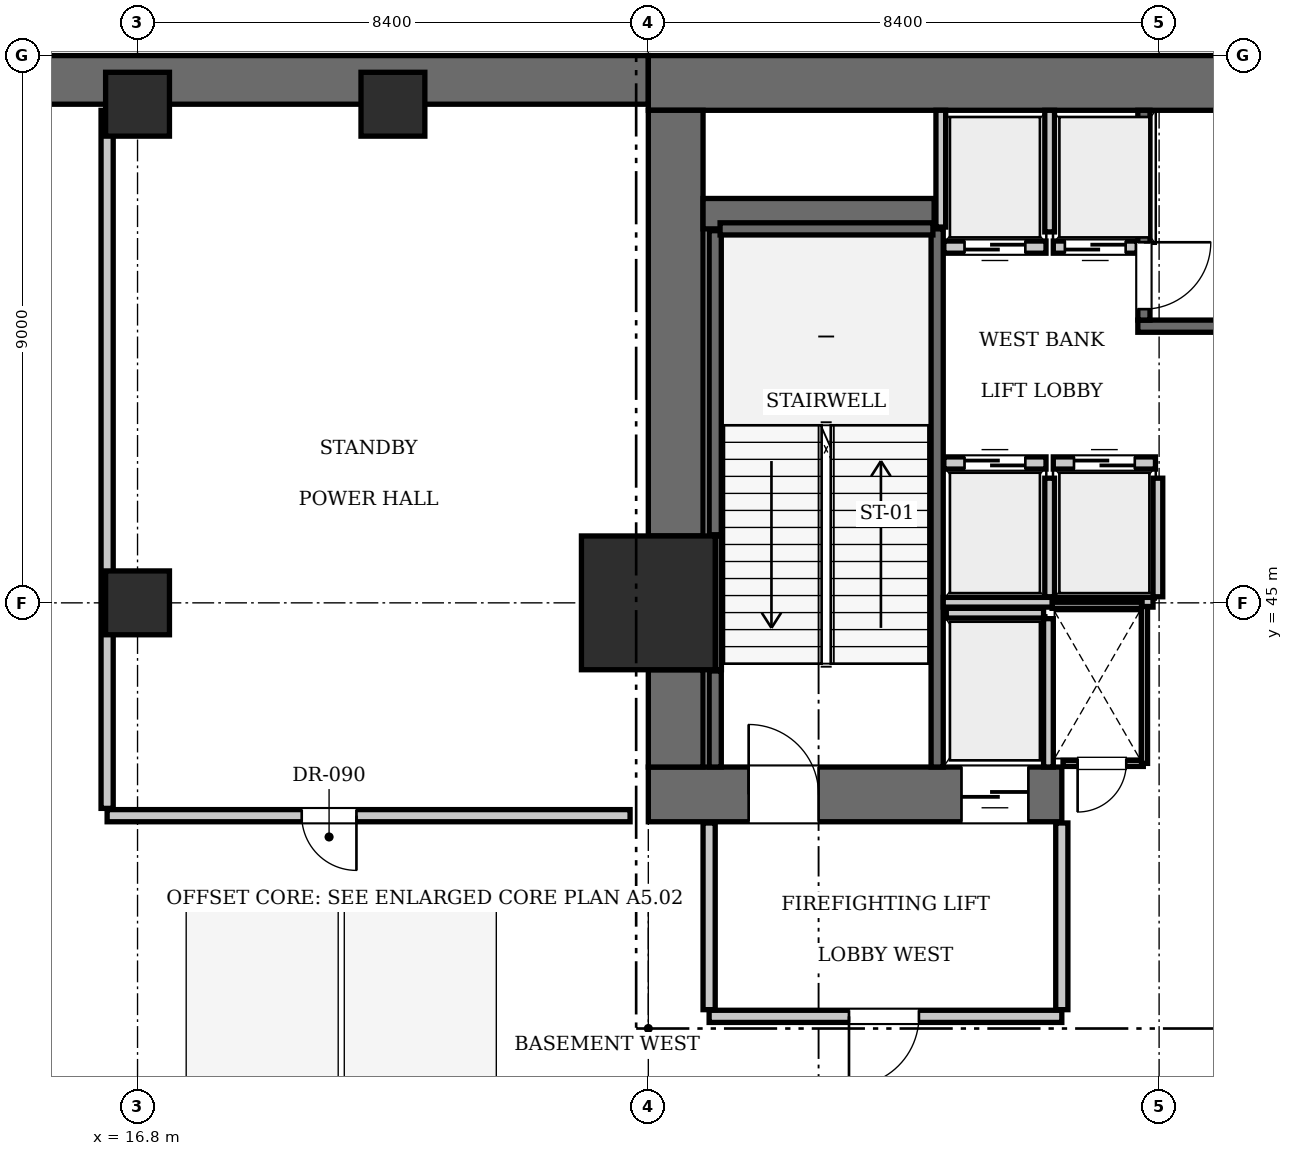
"""IFC4 building model, lengths in metres.
Left out: names, types, materials, properties, quantities, classifications, styles, units other than length and angle.
Written with IfcOpenShell. Run it as: python <this file> out.ifc"""

import sys

from ifc_helpers import new_model, si_unit, direction, frame, frame_2d, origin, origin_2d, place, context, subcontext, project, spatial, rectangle, extrude, element, fill, save


model = new_model("IFC4")
c1 = context("Model", 3, precision=1e-05, world=origin(), true_north=direction((0.0, 1.0)))
c2 = subcontext(c1, "Body", "Model", "MODEL_VIEW")
j1 = project(units=[si_unit("LENGTHUNIT", "METRE"), si_unit("PLANEANGLEUNIT", "RADIAN")], contexts=[c1])
p1 = place(None, origin())
s1 = spatial("IfcSite", under=j1, at=p1, CompositionType="ELEMENT")
p2 = place(p1, origin())
s2 = spatial("IfcBuilding", under=s1, at=p2, CompositionType="ELEMENT")
p3 = place(p2, frame((0.0, 0.0, -5.25)))
s3 = spatial("IfcBuildingStorey", under=s2, at=p3, CompositionType="ELEMENT", Elevation=-5.25)
p4 = place(p3, frame((0.0, 53.6, 0.0), z_axis=(0.0, 0.0, 1.0), x_axis=(1.0, 0.0, 0.0)))
e1 = element("IfcWall", 1, at=p4, inside=s3, PredefinedType="USERDEFINED", context=c2, shape_type="SweptSolid", body=[
    extrude(rectangle(XDim=25.2, YDim=0.8, at=frame_2d((12.6, 0.0))), origin(), (0.0, 0.0, 1.0), 5.25),
])
p5 = place(p3, frame((25.2, 45.0, 0.0), z_axis=(0.0, 0.0, 1.0), x_axis=(1.0, 0.0, 0.0)))
e2 = element("IfcColumn", 2, at=p5, inside=s3, PredefinedType="COLUMN", context=c2, shape_type="SweptSolid", body=[
    extrude(rectangle(XDim=2.2, YDim=2.2, at=origin_2d()), origin(), (0.0, 0.0, 1.0), 5.25),
])
p6 = place(p3, frame((25.2, 53.55, 0.0), z_axis=(0.0, 0.0, 1.0), x_axis=(1.0, 0.0, 0.0)))
e3 = element("IfcWall", 3, at=p6, inside=s3, PredefinedType="SHEAR", context=c2, shape_type="SweptSolid", body=[
    extrude(rectangle(XDim=25.2, YDim=0.9, at=frame_2d((12.6, 0.0))), origin(), (0.0, 0.0, 1.0), 5.25),
])
p7 = place(p3, frame((25.2, 41.85, 0.0), z_axis=(0.0, 0.0, 1.0), x_axis=(1.0, 0.0, 0.0)))
e4 = element("IfcWall", 4, at=p7, inside=s3, PredefinedType="SHEAR", context=c2, shape_type="SweptSolid", body=[
    extrude(rectangle(XDim=6.8, YDim=0.9, at=frame_2d((3.4, 0.0))), origin(), (0.0, 0.0, 1.0), 5.25),
])
p8 = place(p7, frame((1.65, 0.0, 0.0)))
e5 = element("IfcOpeningElement", 5, at=p8, cuts=e4, PredefinedType="OPENING", context=c2, shape_type="SweptSolid", body=[
    extrude(rectangle(XDim=1.15, YDim=2.15, at=frame_2d((0.575, 1.075))), frame((0.0, 0.46, 0.0), z_axis=(0.0, -1.0, 0.0), x_axis=(1.0, 0.0, 0.0)), (0.0, 0.0, 1.0), 0.92),
])
p9 = place(p7, frame((5.15, 0.0, 0.0)))
e6 = element("IfcOpeningElement", 6, at=p9, cuts=e4, PredefinedType="OPENING", context=c2, shape_type="SweptSolid", body=[
    extrude(rectangle(XDim=1.1, YDim=2.2, at=frame_2d((0.55, 1.1))), frame((0.0, 0.46, 0.0), z_axis=(0.0, -1.0, 0.0), x_axis=(1.0, 0.0, 0.0)), (0.0, 0.0, 1.0), 0.92),
])
p10 = place(p3, frame((25.65, 42.3, 0.0), z_axis=(0.0, 0.0, 1.0), x_axis=(0.0, 1.0, 0.0)))
e7 = element("IfcWall", 7, at=p10, inside=s3, PredefinedType="SHEAR", context=c2, shape_type="SweptSolid", body=[
    extrude(rectangle(XDim=1.6, YDim=0.9, at=frame_2d((0.8, 0.0))), origin(), (0.0, 0.0, 1.0), 5.25),
])
p11 = place(p3, frame((25.65, 46.1, 0.0), z_axis=(0.0, 0.0, 1.0), x_axis=(0.0, 1.0, 0.0)))
e8 = element("IfcWall", 8, at=p11, inside=s3, PredefinedType="SHEAR", context=c2, shape_type="SweptSolid", body=[
    extrude(rectangle(XDim=7.0, YDim=0.9, at=frame_2d((3.5, 0.0))), origin(), (0.0, 0.0, 1.0), 5.25),
])
p12 = place(p3, frame((26.1, 51.4, 0.0), z_axis=(0.0, 0.0, 1.0), x_axis=(1.0, 0.0, 0.0)))
e9 = element("IfcWall", 9, at=p12, inside=s3, PredefinedType="SHEAR", context=c2, shape_type="SweptSolid", body=[
    extrude(rectangle(XDim=3.8, YDim=0.5, at=frame_2d((1.9, 0.0))), origin(), (0.0, 0.0, 1.0), 5.25),
])
for number, where, z_axis, x_axis in (
    (10, (16.8, 45.0, 0.0), (0.0, 0.0, 1.0), (1.0, 0.0, 0.0)),
    (11, (16.8, 53.2, 0.0), (0.0, 0.0, 1.0), (1.0, 0.0, 0.0)),
    (12, (21.0, 53.2, 0.0), (0.0, 0.0, 1.0), (1.0, 0.0, 0.0)),
):
    element("IfcColumn", number, at=place(p3, frame(where, z_axis=z_axis, x_axis=x_axis)), inside=s3, PredefinedType="COLUMN", context=c2, shape_type="SweptSolid", body=[
        extrude(rectangle(XDim=1.05, YDim=1.05, at=origin_2d()), origin(), (0.0, 0.0, 1.0), 5.25),
    ])
p13 = place(p3, frame((29.95, 42.3, 0.0), z_axis=(0.0, 0.0, 1.0), x_axis=(0.0, 1.0, 0.0)))
e13 = element("IfcWall", 13, at=p13, inside=s3, PredefinedType="SOLIDWALL", context=c2, shape_type="SweptSolid", body=[
    extrude(rectangle(XDim=8.85, YDim=0.2, at=frame_2d((4.425, 0.0))), origin(), (0.0, 0.0, 1.0), 4.97),
])
p14 = place(p3, frame((26.3, 42.3, 0.0), z_axis=(0.0, 0.0, 1.0), x_axis=(0.0, 1.0, 0.0)))
e14 = element("IfcWall", 14, at=p14, inside=s3, PredefinedType="SOLIDWALL", context=c2, shape_type="SweptSolid", body=[
    extrude(rectangle(XDim=1.58, YDim=0.2, at=frame_2d((0.79, 0.0))), origin(), (0.0, 0.0, 1.0), 4.97),
])
p15 = place(p3, frame((26.3, 46.12, 0.0), z_axis=(0.0, 0.0, 1.0), x_axis=(0.0, 1.0, 0.0)))
e15 = element("IfcWall", 15, at=p15, inside=s3, PredefinedType="SOLIDWALL", context=c2, shape_type="SweptSolid", body=[
    extrude(rectangle(XDim=5.0, YDim=0.2, at=frame_2d((2.5, 0.0))), origin(), (0.0, 0.0, 1.0), 4.97),
])
p16 = place(p3, frame((26.38, 51.15, 0.0), z_axis=(0.0, 0.0, 1.0), x_axis=(1.0, 0.0, 0.0)))
e16 = element("IfcWall", 16, at=p16, inside=s3, PredefinedType="SOLIDWALL", context=c2, shape_type="SweptSolid", body=[
    extrude(rectangle(XDim=3.5, YDim=0.2, at=frame_2d((1.75, 0.0))), origin(), (0.0, 0.0, 1.0), 4.97),
])
p17 = place(p3, frame((26.352, 43.9, 0.0), z_axis=(0.0, 0.0, 1.0), x_axis=(0.0, 1.0, 0.0)))
e17 = element("IfcWall", 17, at=p17, inside=s3, PredefinedType="SOLIDWALL", context=c2, shape_type="SweptSolid", body=[
    extrude(rectangle(XDim=2.2, YDim=0.1, at=frame_2d((1.1, 0.0))), origin(), (0.0, 0.0, 1.0), 4.97),
])
p18 = place(p3, frame((33.25, 49.55, 0.0), z_axis=(0.0, 0.0, 1.0), x_axis=(1.0, 0.0, 0.0)))
e18 = element("IfcWall", 18, at=p18, inside=s3, PredefinedType="SOLIDWALL", context=c2, shape_type="SweptSolid", body=[
    extrude(rectangle(XDim=9.1, YDim=0.2, at=frame_2d((4.55, 0.0))), origin(), (0.0, 0.0, 1.0), 4.97),
])
p19 = place(p3, frame((33.35, 49.65, 0.0), z_axis=(0.0, 0.0, 1.0), x_axis=(0.0, 1.0, 0.0)))
e19 = element("IfcWall", 19, at=p19, inside=s3, PredefinedType="SOLIDWALL", context=c2, shape_type="SweptSolid", body=[
    extrude(rectangle(XDim=3.45, YDim=0.2, at=frame_2d((1.725, 0.0))), origin(), (0.0, 0.0, 1.0), 4.97),
])
p20 = place(p19, frame((0.18, 0.0, 0.0)))
e20 = element("IfcOpeningElement", 20, at=p20, cuts=e19, PredefinedType="OPENING", context=c2, shape_type="SweptSolid", body=[
    extrude(rectangle(XDim=1.1, YDim=2.15, at=frame_2d((0.55, 1.075))), frame((0.0, 0.11, 0.0), z_axis=(0.0, -1.0, 0.0), x_axis=(1.0, 0.0, 0.0)), (0.0, 0.0, 1.0), 0.22),
])
p21 = place(p3, frame((30.06, 47.3, 0.0), z_axis=(0.0, 0.0, 1.0), x_axis=(1.0, 0.0, 0.0)))
e21 = element("IfcWall", 21, at=p21, inside=s3, PredefinedType="SOLIDWALL", context=c2, shape_type="SweptSolid", body=[
    extrude(rectangle(XDim=1.68, YDim=0.2, at=frame_2d((0.84, 0.0))), origin(), (0.0, 0.0, 1.0), 4.97),
])
p22 = place(p21, frame((0.34, 0.0, 0.0)))
e22 = element("IfcOpeningElement", 22, at=p22, cuts=e21, PredefinedType="OPENING", context=c2, shape_type="SweptSolid", body=[
    extrude(rectangle(XDim=1.0, YDim=2.15, at=frame_2d((0.5, 1.075))), frame((0.0, 0.11, 0.0), z_axis=(0.0, -1.0, 0.0), x_axis=(1.0, 0.0, 0.0)), (0.0, 0.0, 1.0), 0.22),
])
p23 = place(p3, frame((31.86, 47.3, 0.0), z_axis=(0.0, 0.0, 1.0), x_axis=(1.0, 0.0, 0.0)))
e23 = element("IfcWall", 23, at=p23, inside=s3, PredefinedType="SOLIDWALL", context=c2, shape_type="SweptSolid", body=[
    extrude(rectangle(XDim=1.68, YDim=0.2, at=frame_2d((0.84, 0.0))), origin(), (0.0, 0.0, 1.0), 4.97),
])
p24 = place(p23, frame((0.34, 0.0, 0.0)))
e24 = element("IfcOpeningElement", 24, at=p24, cuts=e23, PredefinedType="OPENING", context=c2, shape_type="SweptSolid", body=[
    extrude(rectangle(XDim=1.0, YDim=2.15, at=frame_2d((0.5, 1.075))), frame((0.0, 0.11, 0.0), z_axis=(0.0, -1.0, 0.0), x_axis=(1.0, 0.0, 0.0)), (0.0, 0.0, 1.0), 0.22),
])
p25 = place(p3, frame((30.06, 50.85, 0.0), z_axis=(0.0, 0.0, 1.0), x_axis=(1.0, 0.0, 0.0)))
e25 = element("IfcWall", 25, at=p25, inside=s3, PredefinedType="SOLIDWALL", context=c2, shape_type="SweptSolid", body=[
    extrude(rectangle(XDim=1.68, YDim=0.2, at=frame_2d((0.84, 0.0))), origin(), (0.0, 0.0, 1.0), 4.97),
])
p26 = place(p25, frame((0.34, 0.0, 0.0)))
e26 = element("IfcOpeningElement", 26, at=p26, cuts=e25, PredefinedType="OPENING", context=c2, shape_type="SweptSolid", body=[
    extrude(rectangle(XDim=1.0, YDim=2.15, at=frame_2d((0.5, 1.075))), frame((0.0, 0.11, 0.0), z_axis=(0.0, -1.0, 0.0), x_axis=(1.0, 0.0, 0.0)), (0.0, 0.0, 1.0), 0.22),
])
p27 = place(p3, frame((31.86, 50.85, 0.0), z_axis=(0.0, 0.0, 1.0), x_axis=(1.0, 0.0, 0.0)))
e27 = element("IfcWall", 27, at=p27, inside=s3, PredefinedType="SOLIDWALL", context=c2, shape_type="SweptSolid", body=[
    extrude(rectangle(XDim=1.38, YDim=0.2, at=frame_2d((0.69, 0.0))), origin(), (0.0, 0.0, 1.0), 4.97),
])
p28 = place(p27, frame((0.19, 0.0, 0.0)))
e28 = element("IfcOpeningElement", 28, at=p28, cuts=e27, PredefinedType="OPENING", context=c2, shape_type="SweptSolid", body=[
    extrude(rectangle(XDim=1.0, YDim=2.15, at=frame_2d((0.5, 1.075))), frame((0.0, 0.11, 0.0), z_axis=(0.0, -1.0, 0.0), x_axis=(1.0, 0.0, 0.0)), (0.0, 0.0, 1.0), 0.22),
])
p29 = place(p3, frame((30.1, 44.83, 0.0), z_axis=(0.0, 0.0, 1.0), x_axis=(1.0, 0.0, 0.0)))
e29 = element("IfcWall", 29, at=p29, inside=s3, PredefinedType="SOLIDWALL", context=c2, shape_type="SweptSolid", body=[
    extrude(rectangle(XDim=1.6, YDim=0.16, at=frame_2d((0.8, 0.0))), origin(), (0.0, 0.0, 1.0), 4.97),
])
p30 = place(p3, frame((31.78, 42.3, 0.0), z_axis=(0.0, 0.0, 1.0), x_axis=(0.0, 1.0, 0.0)))
e30 = element("IfcWall", 30, at=p30, inside=s3, PredefinedType="SOLIDWALL", context=c2, shape_type="SweptSolid", body=[
    extrude(rectangle(XDim=2.44, YDim=0.16, at=frame_2d((1.22, 0.0))), origin(), (0.0, 0.0, 1.0), 4.97),
])
for number, where, z_axis, x_axis in (
    (31, (31.8, 45.1, 0.0), (0.0, 0.0, 1.0), (0.0, 1.0, 0.0)),
    (32, (33.58, 45.1, 0.0), (0.0, 0.0, 1.0), (0.0, 1.0, 0.0)),
):
    element("IfcWall", number, at=place(p3, frame(where, z_axis=z_axis, x_axis=x_axis)), inside=s3, PredefinedType="SOLIDWALL", context=c2, shape_type="SweptSolid", body=[
        extrude(rectangle(XDim=1.95, YDim=0.16, at=frame_2d((0.975, 0.0))), origin(), (0.0, 0.0, 1.0), 4.97),
    ])
p31 = place(p3, frame((30.05, 45.01, 0.0), z_axis=(0.0, 0.0, 1.0), x_axis=(1.0, 0.0, 0.0)))
e33 = element("IfcWall", 33, at=p31, inside=s3, PredefinedType="SOLIDWALL", context=c2, shape_type="SweptSolid", body=[
    extrude(rectangle(XDim=3.45, YDim=0.16, at=frame_2d((1.725, 0.0))), origin(), (0.0, 0.0, 1.0), 4.97),
])
p32 = place(p3, frame((30.01, 51.18, 0.0), z_axis=(0.0, 0.0, 1.0), x_axis=(0.0, 1.0, 0.0)))
e34 = element("IfcWall", 34, at=p32, inside=s3, PredefinedType="SOLIDWALL", context=c2, shape_type="SweptSolid", body=[
    extrude(rectangle(XDim=1.92, YDim=0.16, at=frame_2d((0.96, 0.0))), origin(), (0.0, 0.0, 1.0), 4.97),
])
p33 = place(p3, frame((31.8, 51.1, 0.0), z_axis=(0.0, 0.0, 1.0), x_axis=(0.0, 1.0, 0.0)))
e35 = element("IfcWall", 35, at=p33, inside=s3, PredefinedType="SOLIDWALL", context=c2, shape_type="SweptSolid", body=[
    extrude(rectangle(XDim=2.0, YDim=0.16, at=frame_2d((1.0, 0.0))), origin(), (0.0, 0.0, 1.0), 4.97),
])
p34 = place(p3, frame((26.2, 38.2, 0.0), z_axis=(0.0, 0.0, 1.0), x_axis=(1.0, 0.0, 0.0)))
e36 = element("IfcWall", 36, at=p34, inside=s3, PredefinedType="PARTITIONING", context=c2, shape_type="SweptSolid", body=[
    extrude(rectangle(XDim=5.8, YDim=0.2, at=frame_2d((2.9, 0.0))), origin(), (0.0, 0.0, 1.0), 4.97),
])
p35 = place(p34, frame((2.3, 0.0, 0.0)))
e37 = element("IfcOpeningElement", 37, at=p35, cuts=e36, PredefinedType="OPENING", context=c2, shape_type="SweptSolid", body=[
    extrude(rectangle(XDim=1.15, YDim=2.15, at=frame_2d((0.575, 1.075))), frame((0.0, 0.11, 0.0), z_axis=(0.0, -1.0, 0.0), x_axis=(1.0, 0.0, 0.0)), (0.0, 0.0, 1.0), 0.22),
])
for number, where, z_axis, x_axis in (
    (38, (26.2, 38.31, 0.0), (0.0, 0.0, 1.0), (0.0, 1.0, 0.0)),
    (39, (32.0, 38.31, 0.0), (0.0, 0.0, 1.0), (0.0, 1.0, 0.0)),
):
    element("IfcWall", number, at=place(p3, frame(where, z_axis=z_axis, x_axis=x_axis)), inside=s3, PredefinedType="PARTITIONING", context=c2, shape_type="SweptSolid", body=[
        extrude(rectangle(XDim=3.07, YDim=0.2, at=frame_2d((1.535, 0.0))), origin(), (0.0, 0.0, 1.0), 4.97),
    ])
p36 = place(p3, frame((32.02, 42.36, 0.0), z_axis=(0.0, 0.0, 1.0), x_axis=(1.0, 0.0, 0.0)))
e40 = element("IfcWall", 40, at=p36, inside=s3, PredefinedType="PARTITIONING", context=c2, shape_type="SweptSolid", body=[
    extrude(rectangle(XDim=1.32, YDim=0.1, at=frame_2d((0.66, 0.0))), origin(), (0.0, 0.0, 1.0), 4.97),
])
p37 = place(p36, frame((0.24, 0.0, 0.0)))
e41 = element("IfcOpeningElement", 41, at=p37, cuts=e40, PredefinedType="OPENING", context=c2, shape_type="SweptSolid", body=[
    extrude(rectangle(XDim=0.8, YDim=2.05, at=frame_2d((0.4, 1.025))), frame((0.0, 0.06, 0.0), z_axis=(0.0, -1.0, 0.0), x_axis=(1.0, 0.0, 0.0)), (0.0, 0.0, 1.0), 0.12),
])
p38 = place(p3, frame((31.84, 44.96, 0.0), z_axis=(0.0, 0.0, 1.0), x_axis=(1.0, 0.0, 0.0)))
e42 = element("IfcWall", 42, at=p38, inside=s3, PredefinedType="PARTITIONING", context=c2, shape_type="SweptSolid", body=[
    extrude(rectangle(XDim=1.48, YDim=0.1, at=frame_2d((0.74, 0.0))), origin(), (0.0, 0.0, 1.0), 4.97),
])
p39 = place(p3, frame((33.36, 42.36, 0.0), z_axis=(0.0, 0.0, 1.0), x_axis=(0.0, 1.0, 0.0)))
e43 = element("IfcWall", 43, at=p39, inside=s3, PredefinedType="PARTITIONING", context=c2, shape_type="SweptSolid", body=[
    extrude(rectangle(XDim=2.58, YDim=0.1, at=frame_2d((1.29, 0.0))), origin(), (0.0, 0.0, 1.0), 4.97),
])
p40 = place(p3, frame((16.3, 41.5, 0.0), z_axis=(0.0, 0.0, 1.0), x_axis=(1.0, 0.0, 0.0)))
e44 = element("IfcWall", 44, at=p40, inside=s3, PredefinedType="PARTITIONING", context=c2, shape_type="SweptSolid", body=[
    extrude(rectangle(XDim=8.6, YDim=0.2, at=frame_2d((4.3, 0.0))), origin(), (0.0, 0.0, 1.0), 4.97),
])
p41 = place(p40, frame((3.2, 0.0, 0.0)))
e45 = element("IfcOpeningElement", 45, at=p41, cuts=e44, PredefinedType="OPENING", context=c2, shape_type="SweptSolid", body=[
    extrude(rectangle(XDim=0.9, YDim=2.1, at=frame_2d((0.45, 1.05))), frame((0.0, 0.11, 0.0), z_axis=(0.0, -1.0, 0.0), x_axis=(1.0, 0.0, 0.0)), (0.0, 0.0, 1.0), 0.22),
])
p42 = place(p3, frame((16.3, 41.62, 0.0), z_axis=(0.0, 0.0, 1.0), x_axis=(0.0, 1.0, 0.0)))
e46 = element("IfcWall", 46, at=p42, inside=s3, PredefinedType="PARTITIONING", context=c2, shape_type="SweptSolid", body=[
    extrude(rectangle(XDim=11.48, YDim=0.2, at=frame_2d((5.74, 0.0))), origin(), (0.0, 0.0, 1.0), 4.97),
])
p43 = place(p8, origin())
e47 = element("IfcDoor", 47, at=p43, inside=s3, OperationType="SINGLE_SWING_LEFT", PredefinedType="DOOR", context=c2, shape_type="SweptSolid", body=[
    extrude(rectangle(XDim=1.15, YDim=2.15, at=frame_2d((0.575, 1.075))), frame((0.0, 0.025, 0.0), z_axis=(0.0, -1.0, 0.0), x_axis=(1.0, 0.0, 0.0)), (0.0, 0.0, 1.0), 0.05),
])
fill(e5, e47)
p44 = place(p20, frame((1.1, 0.0, 0.0), z_axis=(0.0, 0.0, 1.0), x_axis=(-1.0, 0.0, 0.0)))
e48 = element("IfcDoor", 48, at=p44, inside=s3, OperationType="SINGLE_SWING_LEFT", PredefinedType="DOOR", context=c2, shape_type="SweptSolid", body=[
    extrude(rectangle(XDim=1.1, YDim=2.15, at=frame_2d((0.55, 1.075))), frame((0.0, 0.025, 0.0), z_axis=(0.0, -1.0, 0.0), x_axis=(1.0, 0.0, 0.0)), (0.0, 0.0, 1.0), 0.05),
])
fill(e20, e48)
p45 = place(p22, origin())
e49 = element("IfcDoor", 49, at=p45, inside=s3, OperationType="SLIDING_TO_LEFT", PredefinedType="DOOR", context=c2, shape_type="SweptSolid", body=[
    extrude(rectangle(XDim=1.0, YDim=2.15, at=frame_2d((0.5, 1.075))), frame((0.0, 0.025, 0.0), z_axis=(0.0, -1.0, 0.0), x_axis=(1.0, 0.0, 0.0)), (0.0, 0.0, 1.0), 0.05),
])
fill(e22, e49)
p46 = place(p24, origin())
e50 = element("IfcDoor", 50, at=p46, inside=s3, OperationType="SLIDING_TO_LEFT", PredefinedType="DOOR", context=c2, shape_type="SweptSolid", body=[
    extrude(rectangle(XDim=1.0, YDim=2.15, at=frame_2d((0.5, 1.075))), frame((0.0, 0.025, 0.0), z_axis=(0.0, -1.0, 0.0), x_axis=(1.0, 0.0, 0.0)), (0.0, 0.0, 1.0), 0.05),
])
fill(e24, e50)
p47 = place(p26, frame((1.0, 0.0, 0.0), z_axis=(0.0, 0.0, 1.0), x_axis=(-1.0, 0.0, 0.0)))
e51 = element("IfcDoor", 51, at=p47, inside=s3, OperationType="SLIDING_TO_LEFT", PredefinedType="DOOR", context=c2, shape_type="SweptSolid", body=[
    extrude(rectangle(XDim=1.0, YDim=2.15, at=frame_2d((0.5, 1.075))), frame((0.0, 0.025, 0.0), z_axis=(0.0, -1.0, 0.0), x_axis=(1.0, 0.0, 0.0)), (0.0, 0.0, 1.0), 0.05),
])
fill(e26, e51)
p48 = place(p28, frame((1.0, 0.0, 0.0), z_axis=(0.0, 0.0, 1.0), x_axis=(-1.0, 0.0, 0.0)))
e52 = element("IfcDoor", 52, at=p48, inside=s3, OperationType="SLIDING_TO_LEFT", PredefinedType="DOOR", context=c2, shape_type="SweptSolid", body=[
    extrude(rectangle(XDim=1.0, YDim=2.15, at=frame_2d((0.5, 1.075))), frame((0.0, 0.025, 0.0), z_axis=(0.0, -1.0, 0.0), x_axis=(1.0, 0.0, 0.0)), (0.0, 0.0, 1.0), 0.05),
])
fill(e28, e52)
p49 = place(p9, frame((1.1, 0.0, 0.0), z_axis=(0.0, 0.0, 1.0), x_axis=(-1.0, 0.0, 0.0)))
e53 = element("IfcDoor", 53, at=p49, inside=s3, OperationType="SLIDING_TO_LEFT", PredefinedType="DOOR", context=c2, shape_type="SweptSolid", body=[
    extrude(rectangle(XDim=1.1, YDim=2.2, at=frame_2d((0.55, 1.1))), frame((0.0, 0.025, 0.0), z_axis=(0.0, -1.0, 0.0), x_axis=(1.0, 0.0, 0.0)), (0.0, 0.0, 1.0), 0.05),
])
fill(e6, e53)
p50 = place(p35, frame((1.15, 0.0, 0.0), z_axis=(0.0, 0.0, 1.0), x_axis=(-1.0, 0.0, 0.0)))
e54 = element("IfcDoor", 54, at=p50, inside=s3, OperationType="SINGLE_SWING_RIGHT", PredefinedType="DOOR", context=c2, shape_type="SweptSolid", body=[
    extrude(rectangle(XDim=1.15, YDim=2.15, at=frame_2d((0.575, 1.075))), frame((0.0, 0.025, 0.0), z_axis=(0.0, -1.0, 0.0), x_axis=(1.0, 0.0, 0.0)), (0.0, 0.0, 1.0), 0.05),
])
fill(e37, e54)
p51 = place(p37, frame((0.8, 0.0, 0.0), z_axis=(0.0, 0.0, 1.0), x_axis=(-1.0, 0.0, 0.0)))
e55 = element("IfcDoor", 55, at=p51, inside=s3, OperationType="SINGLE_SWING_RIGHT", PredefinedType="DOOR", context=c2, shape_type="SweptSolid", body=[
    extrude(rectangle(XDim=0.8, YDim=2.05, at=frame_2d((0.4, 1.025))), frame((0.0, 0.025, 0.0), z_axis=(0.0, -1.0, 0.0), x_axis=(1.0, 0.0, 0.0)), (0.0, 0.0, 1.0), 0.05),
])
fill(e41, e55)
p52 = place(p41, frame((0.9, 0.0, 0.0), z_axis=(0.0, 0.0, 1.0), x_axis=(-1.0, 0.0, 0.0)))
e56 = element("IfcDoor", 56, at=p52, inside=s3, OperationType="SINGLE_SWING_LEFT", PredefinedType="DOOR", context=c2, shape_type="SweptSolid", body=[
    extrude(rectangle(XDim=0.9, YDim=2.1, at=frame_2d((0.45, 1.05))), frame((0.0, 0.025, 0.0), z_axis=(0.0, -1.0, 0.0), x_axis=(1.0, 0.0, 0.0)), (0.0, 0.0, 1.0), 0.05),
])
fill(e45, e56)
save(model, sys.argv[1])
